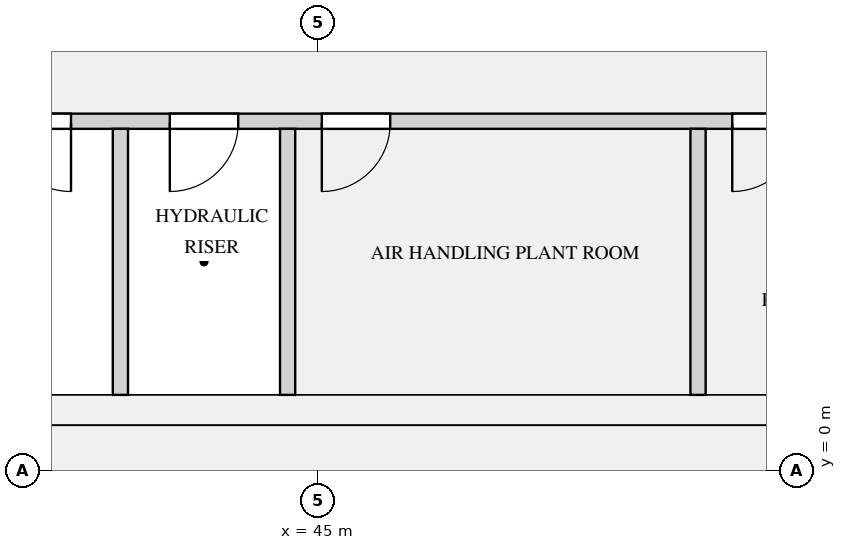
"""IFC4 building model, lengths in metres.
Left out: names, types, materials, properties, quantities, classifications, styles, units other than length and angle.
Written with IfcOpenShell. Run it as: python <this file> out.ifc"""

import sys

from ifc_helpers import new_model, si_unit, direction, frame, frame_2d, origin, place, context, subcontext, project, spatial, rectangle, extrude, element, fill, save


model = new_model("IFC4")
c1 = context("Model", 3, precision=1e-05, world=origin(), true_north=direction((0.0, 1.0)))
c2 = subcontext(c1, "Body", "Model", "MODEL_VIEW")
j1 = project(units=[si_unit("LENGTHUNIT", "METRE"), si_unit("PLANEANGLEUNIT", "RADIAN")], contexts=[c1])
p1 = place(None, origin())
s1 = spatial("IfcSite", under=j1, at=p1, CompositionType="ELEMENT")
p2 = place(p1, origin())
s2 = spatial("IfcBuilding", under=s1, at=p2, CompositionType="ELEMENT")
p3 = place(p2, frame((0.0, 0.0, 240.0)))
s3 = spatial("IfcBuildingStorey", under=s2, at=p3, CompositionType="ELEMENT", Elevation=240.0)
p4 = place(p3, frame((18.6, 0.3, 0.0), z_axis=(0.0, 0.0, 1.0), x_axis=(1.0, 0.0, 0.0)))
e1 = element("IfcWall", 1, at=p4, inside=s3, PredefinedType="SHEAR", context=c2, shape_type="SweptSolid", body=[
    extrude(rectangle(XDim=34.8, YDim=0.6, at=frame_2d((17.4, 0.0))), origin(), (0.0, 0.0, 1.0), 4.2),
])
p5 = place(p3, frame((18.6, 0.8, 0.0), z_axis=(0.0, 0.0, 1.0), x_axis=(1.0, 0.0, 0.0)))
e2 = element("IfcWall", 2, at=p5, inside=s3, PredefinedType="SHEAR", context=c2, shape_type="SweptSolid", body=[
    extrude(rectangle(XDim=34.8, YDim=0.4, at=frame_2d((17.4, 0.0))), origin(), (0.0, 0.0, 1.0), 4.2),
])
p6 = place(p3, frame((40.2, 4.6, 0.0), z_axis=(0.0, 0.0, 1.0), x_axis=(1.0, 0.0, 0.0)))
e3 = element("IfcWall", 3, at=p6, inside=s3, PredefinedType="PARTITIONING", context=c2, shape_type="SweptSolid", body=[
    extrude(rectangle(XDim=12.8, YDim=0.2, at=frame_2d((6.4, 0.0))), origin(), (0.0, 0.0, 1.0), 3.85),
])
p7 = place(p6, frame((4.85, 0.0, 0.0)))
e4 = element("IfcOpeningElement", 4, at=p7, cuts=e3, PredefinedType="OPENING", context=c2, shape_type="SweptSolid", body=[
    extrude(rectangle(XDim=0.9, YDim=2.1, at=frame_2d((0.45, 1.05))), frame((0.0, 0.11, 0.0), z_axis=(0.0, -1.0, 0.0), x_axis=(1.0, 0.0, 0.0)), (0.0, 0.0, 1.0), 0.22),
])
p8 = place(p6, frame((10.25, 0.0, 0.0)))
e5 = element("IfcOpeningElement", 5, at=p8, cuts=e3, PredefinedType="OPENING", context=c2, shape_type="SweptSolid", body=[
    extrude(rectangle(XDim=0.9, YDim=2.1, at=frame_2d((0.45, 1.05))), frame((0.0, 0.11, 0.0), z_axis=(0.0, -1.0, 0.0), x_axis=(1.0, 0.0, 0.0)), (0.0, 0.0, 1.0), 0.22),
])
p9 = place(p6, frame((0.65, 0.0, 0.0)))
e6 = element("IfcOpeningElement", 6, at=p9, cuts=e3, PredefinedType="OPENING", context=c2, shape_type="SweptSolid", body=[
    extrude(rectangle(XDim=0.9, YDim=2.1, at=frame_2d((0.45, 1.05))), frame((0.0, 0.11, 0.0), z_axis=(0.0, -1.0, 0.0), x_axis=(1.0, 0.0, 0.0)), (0.0, 0.0, 1.0), 0.22),
])
p10 = place(p6, frame((2.85, 0.0, 0.0)))
e7 = element("IfcOpeningElement", 7, at=p10, cuts=e3, PredefinedType="OPENING", context=c2, shape_type="SweptSolid", body=[
    extrude(rectangle(XDim=0.9, YDim=2.1, at=frame_2d((0.45, 1.05))), frame((0.0, 0.11, 0.0), z_axis=(0.0, -1.0, 0.0), x_axis=(1.0, 0.0, 0.0)), (0.0, 0.0, 1.0), 0.22),
])
for number, where, z_axis, x_axis in (
    (8, (42.4, 1.0, 0.0), (0.0, 0.0, 1.0), (0.0, 1.0, 0.0)),
    (9, (44.6, 1.0, 0.0), (0.0, 0.0, 1.0), (0.0, 1.0, 0.0)),
    (10, (50.0, 1.0, 0.0), (0.0, 0.0, 1.0), (0.0, 1.0, 0.0)),
):
    element("IfcWall", number, at=place(p3, frame(where, z_axis=z_axis, x_axis=x_axis)), inside=s3, PredefinedType="PARTITIONING", context=c2, shape_type="SweptSolid", body=[
        extrude(rectangle(XDim=3.5, YDim=0.2, at=frame_2d((1.75, 0.0))), origin(), (0.0, 0.0, 1.0), 3.85),
    ])
p11 = place(p7, frame((0.9, 0.0, 0.0), z_axis=(0.0, 0.0, 1.0), x_axis=(-1.0, 0.0, 0.0)))
e11 = element("IfcDoor", 11, at=p11, inside=s3, OperationType="SINGLE_SWING_RIGHT", PredefinedType="DOOR", context=c2, shape_type="SweptSolid", body=[
    extrude(rectangle(XDim=0.9, YDim=2.1, at=frame_2d((0.45, 1.05))), frame((0.0, 0.025, 0.0), z_axis=(0.0, -1.0, 0.0), x_axis=(1.0, 0.0, 0.0)), (0.0, 0.0, 1.0), 0.05),
])
fill(e4, e11)
p12 = place(p8, frame((0.9, 0.0, 0.0), z_axis=(0.0, 0.0, 1.0), x_axis=(-1.0, 0.0, 0.0)))
e12 = element("IfcDoor", 12, at=p12, inside=s3, OperationType="SINGLE_SWING_RIGHT", PredefinedType="DOOR", context=c2, shape_type="SweptSolid", body=[
    extrude(rectangle(XDim=0.9, YDim=2.1, at=frame_2d((0.45, 1.05))), frame((0.0, 0.025, 0.0), z_axis=(0.0, -1.0, 0.0), x_axis=(1.0, 0.0, 0.0)), (0.0, 0.0, 1.0), 0.05),
])
fill(e5, e12)
p13 = place(p9, frame((0.9, 0.0, 0.0), z_axis=(0.0, 0.0, 1.0), x_axis=(-1.0, 0.0, 0.0)))
e13 = element("IfcDoor", 13, at=p13, inside=s3, OperationType="SINGLE_SWING_LEFT", PredefinedType="DOOR", context=c2, shape_type="SweptSolid", body=[
    extrude(rectangle(XDim=0.9, YDim=2.1, at=frame_2d((0.45, 1.05))), frame((0.0, 0.025, 0.0), z_axis=(0.0, -1.0, 0.0), x_axis=(1.0, 0.0, 0.0)), (0.0, 0.0, 1.0), 0.05),
])
fill(e6, e13)
p14 = place(p10, frame((0.9, 0.0, 0.0), z_axis=(0.0, 0.0, 1.0), x_axis=(-1.0, 0.0, 0.0)))
e14 = element("IfcDoor", 14, at=p14, inside=s3, OperationType="SINGLE_SWING_RIGHT", PredefinedType="DOOR", context=c2, shape_type="SweptSolid", body=[
    extrude(rectangle(XDim=0.9, YDim=2.1, at=frame_2d((0.45, 1.05))), frame((0.0, 0.025, 0.0), z_axis=(0.0, -1.0, 0.0), x_axis=(1.0, 0.0, 0.0)), (0.0, 0.0, 1.0), 0.05),
])
fill(e7, e14)
save(model, sys.argv[1])
